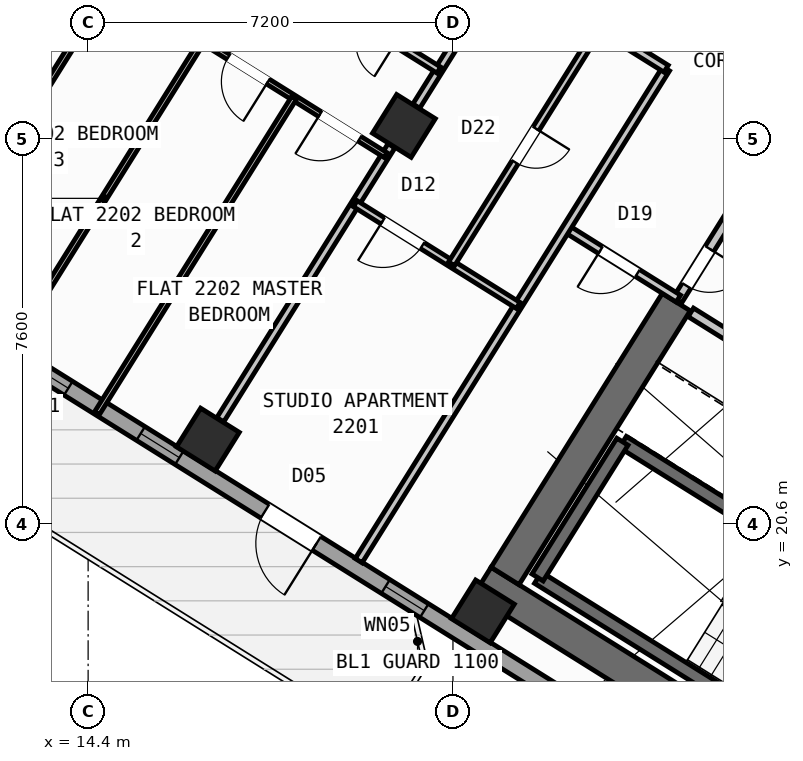
"""IFC4 building model, lengths in metres.
Left out: names, types, materials, properties, quantities, classifications, styles, units other than length and angle.
Written with IfcOpenShell. Run it as: python <this file> out.ifc"""

import sys

from ifc_helpers import new_model, si_unit, direction, frame, frame_2d, origin, origin_2d, place, context, subcontext, project, spatial, rectangle, hollow_rectangle, extrude, source, transform, mapped, element, fill, save


model = new_model("IFC4")
c1 = context("Model", 3, precision=1e-05, world=origin(), true_north=direction((0.0, 1.0)))
c2 = subcontext(c1, "Body", "Model", "MODEL_VIEW")
j1 = project(units=[si_unit("LENGTHUNIT", "METRE"), si_unit("PLANEANGLEUNIT", "RADIAN")], contexts=[c1])
p1 = place(None, origin())
s1 = spatial("IfcSite", under=j1, at=p1, CompositionType="ELEMENT")
p2 = place(p1, origin())
s2 = spatial("IfcBuilding", under=s1, at=p2, CompositionType="ELEMENT")
p3 = place(p2, frame((0.0, 0.0, 90.0)))
s3 = spatial("IfcBuildingStorey", under=s2, at=p3, CompositionType="ELEMENT", Elevation=90.0)
p4 = place(p3, frame((33.409, 12.45, 0.0), z_axis=(0.0, 0.0, 1.0), x_axis=(-0.848051132073, 0.529914405721, 0.0)))
e1 = element("IfcWall", 1, at=p4, inside=s3, PredefinedType="SHEAR", context=c2, shape_type="SweptSolid", body=[
    extrude(rectangle(XDim=13.24, YDim=0.65, at=frame_2d((6.62, 0.0))), origin(), (0.0, 0.0, 1.0), 3.35),
])
p5 = place(p3, frame((26.007, 24.976, 0.0), z_axis=(0.0, 0.0, 1.0), x_axis=(-0.529916319127, -0.848049936456, 0.0)))
e2 = element("IfcWall", 2, at=p5, inside=s3, PredefinedType="SHEAR", context=c2, shape_type="SweptSolid", body=[
    extrude(rectangle(XDim=6.375, YDim=0.65, at=frame_2d((3.188, 0.0))), origin(), (0.0, 0.0, 1.0), 3.35),
])
m1 = source(origin(), c2, "Body", "SweptSolid", [
    extrude(hollow_rectangle(XDim=0.9, YDim=0.9, WallThickness=0.036, at=origin_2d()), origin(), (0.0, 0.0, 1.0), 3.6),
])
for number, where, z_axis, x_axis in (
    (3, (22.191, 18.87, 0.0), (0.0, 0.0, 1.0), (-0.848, 0.53, 0.0)),
    (4, (20.632, 28.452, 0.0), (0.0, 0.0, 1.0), (-0.848, 0.53, 0.0)),
    (5, (16.764, 22.261, 0.0), (0.0, 0.0, 1.0), (-0.848, 0.53, 0.0)),
):
    element("IfcColumn", number, at=place(p3, frame(where, z_axis=z_axis, x_axis=x_axis)), inside=s3, PredefinedType="COLUMN", context=c2, shape_type="MappedRepresentation", body=[
        mapped(m1, transform((0.0, 0.0, 0.0), scale=1.0)),
    ])
p6 = place(p3, frame((31.76, 12.183, 0.0), z_axis=(0.0, 0.0, 1.0), x_axis=(-0.848047074256, 0.529920899612, 0.0)))
e6 = element("IfcWall", 6, at=p6, inside=s3, PredefinedType="STANDARD", context=c2, shape_type="SweptSolid", body=[
    extrude(rectangle(XDim=30.652, YDim=0.32, at=frame_2d((15.326, 0.0))), origin(), (0.0, 0.0, 1.0), 3.35),
])
p7 = place(p6, frame((15.153, 0.0, 0.0)))
e7 = element("IfcOpeningElement", 7, at=p7, cuts=e6, PredefinedType="OPENING", context=c2, shape_type="SweptSolid", body=[
    extrude(rectangle(XDim=1.2, YDim=2.15, at=frame_2d((0.6, 1.075))), frame((0.0, 0.17, 0.0), z_axis=(0.0, -1.0, 0.0), x_axis=(1.0, 0.0, 0.0)), (0.0, 0.0, 1.0), 0.34),
])
p8 = place(p6, frame((2.002, 0.0, 0.8)))
e8 = element("IfcOpeningElement", 8, at=p8, cuts=e6, PredefinedType="OPENING", context=c2, shape_type="SweptSolid", body=[
    extrude(rectangle(XDim=2.1, YDim=1.55, at=frame_2d((1.05, 0.775))), frame((0.0, 0.17, 0.0), z_axis=(0.0, -1.0, 0.0), x_axis=(1.0, 0.0, 0.0)), (0.0, 0.0, 1.0), 0.34),
])
p9 = place(p6, frame((7.206, 0.0, 0.8)))
e9 = element("IfcOpeningElement", 9, at=p9, cuts=e6, PredefinedType="OPENING", context=c2, shape_type="SweptSolid", body=[
    extrude(rectangle(XDim=2.1, YDim=1.55, at=frame_2d((1.05, 0.775))), frame((0.0, 0.17, 0.0), z_axis=(0.0, -1.0, 0.0), x_axis=(1.0, 0.0, 0.0)), (0.0, 0.0, 1.0), 0.34),
])
p10 = place(p6, frame((12.648, 0.0, 1.0)))
e10 = element("IfcOpeningElement", 10, at=p10, cuts=e6, PredefinedType="OPENING", context=c2, shape_type="SweptSolid", body=[
    extrude(rectangle(XDim=0.9, YDim=1.25, at=frame_2d((0.45, 0.625))), frame((0.0, 0.17, 0.0), z_axis=(0.0, -1.0, 0.0), x_axis=(1.0, 0.0, 0.0)), (0.0, 0.0, 1.0), 0.34),
])
p11 = place(p6, frame((27.974, 0.0, 0.95)))
e11 = element("IfcOpeningElement", 11, at=p11, cuts=e6, PredefinedType="OPENING", context=c2, shape_type="SweptSolid", body=[
    extrude(rectangle(XDim=1.2, YDim=1.4, at=frame_2d((0.6, 0.7))), frame((0.0, 0.17, 0.0), z_axis=(0.0, -1.0, 0.0), x_axis=(1.0, 0.0, 0.0)), (0.0, 0.0, 1.0), 0.34),
])
p12 = place(p6, frame((18.347, 0.0, 1.0)))
e12 = element("IfcOpeningElement", 12, at=p12, cuts=e6, PredefinedType="OPENING", context=c2, shape_type="SweptSolid", body=[
    extrude(rectangle(XDim=0.9, YDim=1.25, at=frame_2d((0.45, 0.625))), frame((0.0, 0.17, 0.0), z_axis=(0.0, -1.0, 0.0), x_axis=(1.0, 0.0, 0.0)), (0.0, 0.0, 1.0), 0.34),
])
p13 = place(p6, frame((20.931, 0.0, 1.0)))
e13 = element("IfcOpeningElement", 13, at=p13, cuts=e6, PredefinedType="OPENING", context=c2, shape_type="SweptSolid", body=[
    extrude(rectangle(XDim=0.65, YDim=1.15, at=frame_2d((0.325, 0.575))), frame((0.0, 0.17, 0.0), z_axis=(0.0, -1.0, 0.0), x_axis=(1.0, 0.0, 0.0)), (0.0, 0.0, 1.0), 0.34),
])
p14 = place(p6, frame((22.938, 0.0, 1.0)))
e14 = element("IfcOpeningElement", 14, at=p14, cuts=e6, PredefinedType="OPENING", context=c2, shape_type="SweptSolid", body=[
    extrude(rectangle(XDim=0.9, YDim=1.25, at=frame_2d((0.45, 0.625))), frame((0.0, 0.17, 0.0), z_axis=(0.0, -1.0, 0.0), x_axis=(1.0, 0.0, 0.0)), (0.0, 0.0, 1.0), 0.34),
])
p15 = place(p6, frame((25.069, 0.0, 1.0)))
e15 = element("IfcOpeningElement", 15, at=p15, cuts=e6, PredefinedType="OPENING", context=c2, shape_type="SweptSolid", body=[
    extrude(rectangle(XDim=0.9, YDim=1.25, at=frame_2d((0.45, 0.625))), frame((0.0, 0.17, 0.0), z_axis=(0.0, -1.0, 0.0), x_axis=(1.0, 0.0, 0.0)), (0.0, 0.0, 1.0), 0.34),
])
p16 = place(p3, frame((5.7, 28.71, 0.0), z_axis=(0.0, 0.0, 1.0), x_axis=(0.529923711467, 0.8480453172, 0.0)))
e16 = element("IfcWall", 16, at=p16, inside=s3, PredefinedType="STANDARD", context=c2, shape_type="SweptSolid", body=[
    extrude(rectangle(XDim=21.587, YDim=0.32, at=frame_2d((10.794, 0.0))), origin(), (0.0, 0.0, 1.0), 2.775),
])
p17 = place(p16, frame((2.994, 0.0, 0.8)))
e17 = element("IfcOpeningElement", 17, at=p17, cuts=e16, PredefinedType="OPENING", context=c2, shape_type="SweptSolid", body=[
    extrude(rectangle(XDim=2.1, YDim=1.55, at=frame_2d((1.05, 0.775))), frame((0.0, 0.17, 0.0), z_axis=(0.0, -1.0, 0.0), x_axis=(1.0, 0.0, 0.0)), (0.0, 0.0, 1.0), 0.34),
])
p18 = place(p16, frame((9.739, 0.0, 1.0)))
e18 = element("IfcOpeningElement", 18, at=p18, cuts=e16, PredefinedType="OPENING", context=c2, shape_type="SweptSolid", body=[
    extrude(rectangle(XDim=0.9, YDim=1.25, at=frame_2d((0.45, 0.625))), frame((0.0, 0.17, 0.0), z_axis=(0.0, -1.0, 0.0), x_axis=(1.0, 0.0, 0.0)), (0.0, 0.0, 1.0), 0.34),
])
p19 = place(p16, frame((18.476, 0.0, 1.0)))
e19 = element("IfcOpeningElement", 19, at=p19, cuts=e16, PredefinedType="OPENING", context=c2, shape_type="SweptSolid", body=[
    extrude(rectangle(XDim=0.9, YDim=1.25, at=frame_2d((0.45, 0.625))), frame((0.0, 0.17, 0.0), z_axis=(0.0, -1.0, 0.0), x_axis=(1.0, 0.0, 0.0)), (0.0, 0.0, 1.0), 0.34),
])
p20 = place(p3, frame((29.605, 15.581, 0.0), z_axis=(0.0, 0.0, 1.0), x_axis=(-0.848036911448, 0.529937163087, 0.0)))
e20 = element("IfcWall", 20, at=p20, inside=s3, PredefinedType="SHEAR", context=c2, shape_type="SweptSolid", body=[
    extrude(rectangle(XDim=7.46, YDim=0.26, at=frame_2d((3.73, 0.0))), origin(), (0.0, 0.0, 1.0), 3.35),
])
p21 = place(p3, frame((31.28, 18.261, 0.0), z_axis=(0.0, 0.0, 1.0), x_axis=(-0.848051618787, 0.529913626805, 0.0)))
e21 = element("IfcWall", 21, at=p21, inside=s3, PredefinedType="SHEAR", context=c2, shape_type="SweptSolid", body=[
    extrude(rectangle(XDim=7.46, YDim=0.26, at=frame_2d((3.73, 0.0))), origin(), (0.0, 0.0, 1.0), 3.35),
])
p22 = place(p21, frame((0.36, 0.0, 0.0)))
e22 = element("IfcOpeningElement", 22, at=p22, cuts=e21, PredefinedType="OPENING", context=c2, shape_type="SweptSolid", body=[
    extrude(rectangle(XDim=0.86, YDim=2.05, at=frame_2d((0.43, 1.025))), frame((0.0, 0.14, 0.0), z_axis=(0.0, -1.0, 0.0), x_axis=(1.0, 0.0, 0.0)), (0.0, 0.0, 1.0), 0.28),
])
p23 = place(p3, frame((24.945, 22.22, 0.0), z_axis=(0.0, 0.0, 1.0), x_axis=(-0.529908658664, -0.84805472316, 0.0)))
e23 = element("IfcWall", 23, at=p23, inside=s3, PredefinedType="SHEAR", context=c2, shape_type="SweptSolid", body=[
    extrude(rectangle(XDim=3.16, YDim=0.26, at=frame_2d((1.58, 0.0))), origin(), (0.0, 0.0, 1.0), 3.35),
])
p24 = place(p3, frame((31.525, 21.504, 0.0), z_axis=(0.0, 0.0, 1.0), x_axis=(-0.848044998614, 0.529924221305, 0.0)))
e24 = element("IfcWall", 24, at=p24, inside=s3, PredefinedType="STANDARD", context=c2, shape_type="SweptSolid", body=[
    extrude(rectangle(XDim=6.168, YDim=0.2, at=frame_2d((3.084, 0.0))), origin(), (0.0, 0.0, 1.0), 3.34),
])
p25 = place(p24, frame((4.4, 0.0, 0.0)))
e25 = element("IfcOpeningElement", 25, at=p25, cuts=e24, PredefinedType="OPENING", context=c2, shape_type="SweptSolid", body=[
    extrude(rectangle(XDim=0.86, YDim=2.05, at=frame_2d((0.43, 1.025))), frame((0.0, 0.11, 0.0), z_axis=(0.0, -1.0, 0.0), x_axis=(1.0, 0.0, 0.0)), (0.0, 0.0, 1.0), 0.22),
])
p26 = place(p24, frame((0.35, 0.0, 0.0)))
e26 = element("IfcOpeningElement", 26, at=p26, cuts=e24, PredefinedType="OPENING", context=c2, shape_type="SweptSolid", body=[
    extrude(rectangle(XDim=0.86, YDim=2.05, at=frame_2d((0.43, 1.025))), frame((0.0, 0.11, 0.0), z_axis=(0.0, -1.0, 0.0), x_axis=(1.0, 0.0, 0.0)), (0.0, 0.0, 1.0), 0.22),
])
p27 = place(p3, frame((27.596, 27.52, 0.0), z_axis=(0.0, 0.0, 1.0), x_axis=(-0.529865479138, -0.848081702443, 0.0)))
e27 = element("IfcWall", 27, at=p27, inside=s3, PredefinedType="STANDARD", context=c2, shape_type="SweptSolid", body=[
    extrude(rectangle(XDim=2.96, YDim=0.2, at=frame_2d((1.48, 0.0))), origin(), (0.0, 0.0, 1.0), 3.34),
])
p28 = place(p27, frame((1.76, 0.0, 0.0)))
e28 = element("IfcOpeningElement", 28, at=p28, cuts=e27, PredefinedType="OPENING", context=c2, shape_type="SweptSolid", body=[
    extrude(rectangle(XDim=0.86, YDim=2.05, at=frame_2d((0.43, 1.025))), frame((0.0, 0.11, 0.0), z_axis=(0.0, -1.0, 0.0), x_axis=(1.0, 0.0, 0.0)), (0.0, 0.0, 1.0), 0.22),
])
p29 = place(p3, frame((26.049, 25.044, 0.0), z_axis=(0.0, 0.0, 1.0), x_axis=(-0.848050851465, 0.529914854792, 0.0)))
e29 = element("IfcWall", 29, at=p29, inside=s3, PredefinedType="PARTITIONING", context=c2, shape_type="SweptSolid", body=[
    extrude(rectangle(XDim=2.61, YDim=0.16, at=frame_2d((1.305, 0.0))), origin(), (0.0, 0.0, 1.0), 2.775),
])
p30 = place(p29, frame((0.95, 0.0, 0.0)))
e30 = element("IfcOpeningElement", 30, at=p30, cuts=e29, PredefinedType="OPENING", context=c2, shape_type="SweptSolid", body=[
    extrude(rectangle(XDim=0.86, YDim=2.05, at=frame_2d((0.43, 1.025))), frame((0.0, 0.09, 0.0), z_axis=(0.0, -1.0, 0.0), x_axis=(1.0, 0.0, 0.0)), (0.0, 0.0, 1.0), 0.18),
])
p31 = place(p3, frame((25.807, 29.582, 0.0), z_axis=(0.0, 0.0, 1.0), x_axis=(-0.529920357077, -0.848047413271, 0.0)))
e31 = element("IfcWall", 31, at=p31, inside=s3, PredefinedType="PARTITIONING", context=c2, shape_type="SweptSolid", body=[
    extrude(rectangle(XDim=11.45, YDim=0.16, at=frame_2d((5.725, 0.0))), origin(), (0.0, 0.0, 1.0), 3.34),
])
p32 = place(p3, frame((25.807, 29.582, 0.0), z_axis=(0.0, 0.0, 1.0), x_axis=(-0.848052408131, 0.529912363569, 0.0)))
e32 = element("IfcWall", 32, at=p32, inside=s3, PredefinedType="PARTITIONING", context=c2, shape_type="SweptSolid", body=[
    extrude(rectangle(XDim=16.73, YDim=0.16, at=frame_2d((8.365, 0.0))), origin(), (0.0, 0.0, 1.0), 3.34),
])
p33 = place(p32, frame((2.22, 0.0, 0.0)))
e33 = element("IfcOpeningElement", 33, at=p33, cuts=e32, PredefinedType="OPENING", context=c2, shape_type="SweptSolid", body=[
    extrude(rectangle(XDim=0.86, YDim=2.05, at=frame_2d((0.43, 1.025))), frame((0.0, 0.09, 0.0), z_axis=(0.0, -1.0, 0.0), x_axis=(1.0, 0.0, 0.0)), (0.0, 0.0, 1.0), 0.18),
])
p34 = place(p32, frame((14.013, 0.0, 0.0)))
e34 = element("IfcOpeningElement", 34, at=p34, cuts=e32, PredefinedType="OPENING", context=c2, shape_type="SweptSolid", body=[
    extrude(rectangle(XDim=1.0, YDim=2.1, at=frame_2d((0.5, 1.05))), frame((0.0, 0.09, 0.0), z_axis=(0.0, -1.0, 0.0), x_axis=(1.0, 0.0, 0.0)), (0.0, 0.0, 1.0), 0.18),
])
p35 = place(p3, frame((22.593, 31.59, 0.0), z_axis=(0.0, 0.0, 1.0), x_axis=(-0.529924383291, -0.848044897393, 0.0)))
e35 = element("IfcWall", 35, at=p35, inside=s3, PredefinedType="PARTITIONING", context=c2, shape_type="SweptSolid", body=[
    extrude(rectangle(XDim=3.238, YDim=0.16, at=frame_2d((1.619, 0.0))), origin(), (0.0, 0.0, 1.0), 2.775),
])
p36 = place(p3, frame((20.387, 28.06, 0.0), z_axis=(0.0, 0.0, 1.0), x_axis=(-0.529902564924, -0.848058530814, 0.0)))
e36 = element("IfcWall", 36, at=p36, inside=s3, PredefinedType="PARTITIONING", context=c2, shape_type="SweptSolid", body=[
    extrude(rectangle(XDim=6.376, YDim=0.16, at=frame_2d((3.188, 0.0))), origin(), (0.0, 0.0, 1.0), 2.775),
])
p37 = place(p3, frame((22.887, 24.909, 0.0), z_axis=(0.0, 0.0, 1.0), x_axis=(-0.84803087207, 0.529946827537, 0.0)))
e37 = element("IfcWall", 37, at=p37, inside=s3, PredefinedType="PLUMBINGWALL", context=c2, shape_type="SweptSolid", body=[
    extrude(rectangle(XDim=3.79, YDim=0.14, at=frame_2d((1.895, 0.0))), origin(), (0.0, 0.0, 1.0), 3.34),
])
p38 = place(p37, frame((2.23, 0.0, 0.0)))
e38 = element("IfcOpeningElement", 38, at=p38, cuts=e37, PredefinedType="OPENING", context=c2, shape_type="SweptSolid", body=[
    extrude(rectangle(XDim=0.92, YDim=2.08, at=frame_2d((0.46, 1.04))), frame((0.0, 0.08, 0.0), z_axis=(0.0, -1.0, 0.0), x_axis=(1.0, 0.0, 0.0)), (0.0, 0.0, 1.0), 0.16),
])
p39 = place(p3, frame((24.492, 30.403, 0.0), z_axis=(0.0, 0.0, 1.0), x_axis=(-0.529919283494, -0.848048084121, 0.0)))
e39 = element("IfcWall", 39, at=p39, inside=s3, PredefinedType="PLUMBINGWALL", context=c2, shape_type="SweptSolid", body=[
    extrude(rectangle(XDim=5.51, YDim=0.14, at=frame_2d((2.755, 0.0))), origin(), (0.0, 0.0, 1.0), 2.995),
])
p40 = place(p39, frame((2.365, 0.0, 0.0)))
e40 = element("IfcOpeningElement", 40, at=p40, cuts=e39, PredefinedType="OPENING", context=c2, shape_type="SweptSolid", body=[
    extrude(rectangle(XDim=0.78, YDim=2.05, at=frame_2d((0.39, 1.025))), frame((0.0, 0.08, 0.0), z_axis=(0.0, -1.0, 0.0), x_axis=(1.0, 0.0, 0.0)), (0.0, 0.0, 1.0), 0.16),
])
p41 = place(p3, frame((15.361, 36.108, 0.0), z_axis=(0.0, 0.0, 1.0), x_axis=(-0.529912802348, -0.848052133956, 0.0)))
e41 = element("IfcWall", 41, at=p41, inside=s3, PredefinedType="PARTITIONING", context=c2, shape_type="SweptSolid", body=[
    extrude(rectangle(XDim=11.72, YDim=0.11, at=frame_2d((5.86, 0.0))), origin(), (0.0, 0.0, 1.0), 2.995),
])
p42 = place(p41, frame((3.0, 0.0, 0.0)))
e42 = element("IfcOpeningElement", 42, at=p42, cuts=e41, PredefinedType="OPENING", context=c2, shape_type="SweptSolid", body=[
    extrude(rectangle(XDim=0.78, YDim=2.05, at=frame_2d((0.39, 1.025))), frame((0.0, 0.065, 0.0), z_axis=(0.0, -1.0, 0.0), x_axis=(1.0, 0.0, 0.0)), (0.0, 0.0, 1.0), 0.13),
])
p43 = place(p3, frame((21.321, 29.554, 0.0), z_axis=(0.0, 0.0, 1.0), x_axis=(-0.84803529765, 0.529939745575, 0.0)))
e43 = element("IfcWall", 43, at=p43, inside=s3, PredefinedType="PLUMBINGWALL", context=c2, shape_type="SweptSolid", body=[
    extrude(rectangle(XDim=8.527, YDim=0.14, at=frame_2d((4.264, 0.0))), origin(), (0.0, 0.0, 1.0), 3.34),
])
p44 = place(p43, frame((5.155, 0.0, 0.0)))
e44 = element("IfcOpeningElement", 44, at=p44, cuts=e43, PredefinedType="OPENING", context=c2, shape_type="SweptSolid", body=[
    extrude(rectangle(XDim=0.78, YDim=2.05, at=frame_2d((0.39, 1.025))), frame((0.0, 0.08, 0.0), z_axis=(0.0, -1.0, 0.0), x_axis=(1.0, 0.0, 0.0)), (0.0, 0.0, 1.0), 0.16),
])
p45 = place(p43, frame((1.011, 0.0, 0.0)))
e45 = element("IfcOpeningElement", 45, at=p45, cuts=e43, PredefinedType="OPENING", context=c2, shape_type="SweptSolid", body=[
    extrude(rectangle(XDim=0.78, YDim=2.05, at=frame_2d((0.39, 1.025))), frame((0.0, 0.08, 0.0), z_axis=(0.0, -1.0, 0.0), x_axis=(1.0, 0.0, 0.0)), (0.0, 0.0, 1.0), 0.16),
])
p46 = place(p3, frame((20.272, 27.875, 0.0), z_axis=(0.0, 0.0, 1.0), x_axis=(-0.848056204746, 0.529906287557, 0.0)))
e46 = element("IfcWall", 46, at=p46, inside=s3, PredefinedType="PARTITIONING", context=c2, shape_type="SweptSolid", body=[
    extrude(rectangle(XDim=8.527, YDim=0.11, at=frame_2d((4.264, 0.0))), origin(), (0.0, 0.0, 1.0), 3.34),
])
p47 = place(p46, frame((0.606, 0.0, 0.0)))
e47 = element("IfcOpeningElement", 47, at=p47, cuts=e46, PredefinedType="OPENING", context=c2, shape_type="SweptSolid", body=[
    extrude(rectangle(XDim=0.92, YDim=2.08, at=frame_2d((0.46, 1.04))), frame((0.0, 0.065, 0.0), z_axis=(0.0, -1.0, 0.0), x_axis=(1.0, 0.0, 0.0)), (0.0, 0.0, 1.0), 0.13),
])
p48 = place(p46, frame((2.738, 0.0, 0.0)))
e48 = element("IfcOpeningElement", 48, at=p48, cuts=e46, PredefinedType="OPENING", context=c2, shape_type="SweptSolid", body=[
    extrude(rectangle(XDim=0.92, YDim=2.08, at=frame_2d((0.46, 1.04))), frame((0.0, 0.065, 0.0), z_axis=(0.0, -1.0, 0.0), x_axis=(1.0, 0.0, 0.0)), (0.0, 0.0, 1.0), 0.13),
])
p49 = place(p46, frame((4.869, 0.0, 0.0)))
e49 = element("IfcOpeningElement", 49, at=p49, cuts=e46, PredefinedType="OPENING", context=c2, shape_type="SweptSolid", body=[
    extrude(rectangle(XDim=0.92, YDim=2.08, at=frame_2d((0.46, 1.04))), frame((0.0, 0.065, 0.0), z_axis=(0.0, -1.0, 0.0), x_axis=(1.0, 0.0, 0.0)), (0.0, 0.0, 1.0), 0.13),
])
p50 = place(p46, frame((7.001, 0.0, 0.0)))
e50 = element("IfcOpeningElement", 50, at=p50, cuts=e46, PredefinedType="OPENING", context=c2, shape_type="SweptSolid", body=[
    extrude(rectangle(XDim=0.92, YDim=2.08, at=frame_2d((0.46, 1.04))), frame((0.0, 0.065, 0.0), z_axis=(0.0, -1.0, 0.0), x_axis=(1.0, 0.0, 0.0)), (0.0, 0.0, 1.0), 0.13),
])
for number, where, z_axis, x_axis in (
    (51, (18.464, 29.005, 0.0), (0.0, 0.0, 1.0), (-0.53, -0.848, 0.0)),
    (52, (16.656, 30.135, 0.0), (0.0, 0.0, 1.0), (-0.53, -0.848, 0.0)),
):
    element("IfcWall", number, at=place(p3, frame(where, z_axis=z_axis, x_axis=x_axis)), inside=s3, PredefinedType="PARTITIONING", context=c2, shape_type="SweptSolid", body=[
        extrude(rectangle(XDim=7.34, YDim=0.11, at=frame_2d((3.67, 0.0))), origin(), (0.0, 0.0, 1.0), 2.995),
    ])
p51 = place(p3, frame((14.848, 31.264, 0.0), z_axis=(0.0, 0.0, 1.0), x_axis=(-0.529920534869, -0.848047302174, 0.0)))
e53 = element("IfcWall", 53, at=p51, inside=s3, PredefinedType="PARTITIONING", context=c2, shape_type="SweptSolid", body=[
    extrude(rectangle(XDim=6.158, YDim=0.11, at=frame_2d((3.079, 0.0))), origin(), (0.0, 0.0, 1.0), 2.775),
])
m2 = source(origin(), c2, "Body", "SweptSolid", [
    extrude(rectangle(XDim=1.2, YDim=2.15, at=frame_2d((0.6, 1.075))), frame((0.0, 0.025, 0.0), z_axis=(0.0, -1.0, 0.0), x_axis=(1.0, 0.0, 0.0)), (0.0, 0.0, 1.0), 0.05),
])
p52 = place(p7, origin())
e54 = element("IfcDoor", 54, at=p52, inside=s3, OperationType="SINGLE_SWING_LEFT", PredefinedType="DOOR", context=c2, shape_type="MappedRepresentation", body=[
    mapped(m2, transform((0.0, 0.0, 0.0), scale=1.0)),
])
fill(e7, e54)
m3 = source(origin(), c2, "Body", "SweptSolid", [
    extrude(rectangle(XDim=0.9, YDim=1.25, at=frame_2d((0.45, 0.625))), frame((0.0, 0.03, 0.0), z_axis=(0.0, -1.0, 0.0), x_axis=(1.0, 0.0, 0.0)), (0.0, 0.0, 1.0), 0.06),
])
p53 = place(p10, origin())
e55 = element("IfcWindow", 55, at=p53, inside=s3, PartitioningType="SINGLE_PANEL", PredefinedType="WINDOW", context=c2, shape_type="MappedRepresentation", body=[
    mapped(m3, transform((0.0, 0.0, 0.0), scale=1.0)),
])
fill(e10, e55)
p54 = place(p12, origin())
e56 = element("IfcWindow", 56, at=p54, inside=s3, PartitioningType="SINGLE_PANEL", PredefinedType="WINDOW", context=c2, shape_type="MappedRepresentation", body=[
    mapped(m3, transform((0.0, 0.0, 0.0), scale=1.0)),
])
fill(e12, e56)
m4 = source(origin(), c2, "Body", "SweptSolid", [
    extrude(rectangle(XDim=0.65, YDim=1.15, at=frame_2d((0.325, 0.575))), frame((0.0, 0.03, 0.0), z_axis=(0.0, -1.0, 0.0), x_axis=(1.0, 0.0, 0.0)), (0.0, 0.0, 1.0), 0.06),
])
p55 = place(p13, origin())
e57 = element("IfcWindow", 57, at=p55, inside=s3, PartitioningType="SINGLE_PANEL", PredefinedType="WINDOW", context=c2, shape_type="MappedRepresentation", body=[
    mapped(m4, transform((0.0, 0.0, 0.0), scale=1.0)),
])
fill(e13, e57)
m5 = source(origin(), c2, "Body", "SweptSolid", [
    extrude(rectangle(XDim=0.86, YDim=2.05, at=frame_2d((0.43, 1.025))), frame((0.0, 0.025, 0.0), z_axis=(0.0, -1.0, 0.0), x_axis=(1.0, 0.0, 0.0)), (0.0, 0.0, 1.0), 0.05),
])
p56 = place(p30, origin())
e58 = element("IfcDoor", 58, at=p56, inside=s3, OperationType="SINGLE_SWING_RIGHT", PredefinedType="DOOR", context=c2, shape_type="MappedRepresentation", body=[
    mapped(m5, transform((0.0, 0.0, 0.0), scale=1.0)),
])
fill(e30, e58)
p57 = place(p28, origin())
e59 = element("IfcDoor", 59, at=p57, inside=s3, OperationType="SINGLE_SWING_LEFT", PredefinedType="DOOR", context=c2, shape_type="MappedRepresentation", body=[
    mapped(m5, transform((0.0, 0.0, 0.0), scale=1.0)),
])
fill(e28, e59)
m6 = source(origin(), c2, "Body", "SweptSolid", [
    extrude(rectangle(XDim=0.92, YDim=2.08, at=frame_2d((0.46, 1.04))), frame((0.0, 0.025, 0.0), z_axis=(0.0, -1.0, 0.0), x_axis=(1.0, 0.0, 0.0)), (0.0, 0.0, 1.0), 0.05),
])
p58 = place(p38, origin())
e60 = element("IfcDoor", 60, at=p58, inside=s3, OperationType="SINGLE_SWING_RIGHT", PredefinedType="DOOR", context=c2, shape_type="MappedRepresentation", body=[
    mapped(m6, transform((0.0, 0.0, 0.0), scale=1.0)),
])
fill(e38, e60)
m7 = source(origin(), c2, "Body", "SweptSolid", [
    extrude(rectangle(XDim=0.78, YDim=2.05, at=frame_2d((0.39, 1.025))), frame((0.0, 0.025, 0.0), z_axis=(0.0, -1.0, 0.0), x_axis=(1.0, 0.0, 0.0)), (0.0, 0.0, 1.0), 0.05),
])
p59 = place(p40, origin())
e61 = element("IfcDoor", 61, at=p59, inside=s3, OperationType="SINGLE_SWING_LEFT", PredefinedType="DOOR", context=c2, shape_type="MappedRepresentation", body=[
    mapped(m7, transform((0.0, 0.0, 0.0), scale=1.0)),
])
fill(e40, e61)
p60 = place(p47, origin())
e62 = element("IfcDoor", 62, at=p60, inside=s3, OperationType="SINGLE_SWING_RIGHT", PredefinedType="DOOR", context=c2, shape_type="MappedRepresentation", body=[
    mapped(m6, transform((0.0, 0.0, 0.0), scale=1.0)),
])
fill(e47, e62)
p61 = place(p48, origin())
e63 = element("IfcDoor", 63, at=p61, inside=s3, OperationType="SINGLE_SWING_LEFT", PredefinedType="DOOR", context=c2, shape_type="MappedRepresentation", body=[
    mapped(m6, transform((0.0, 0.0, 0.0), scale=1.0)),
])
fill(e48, e63)
save(model, sys.argv[1])
